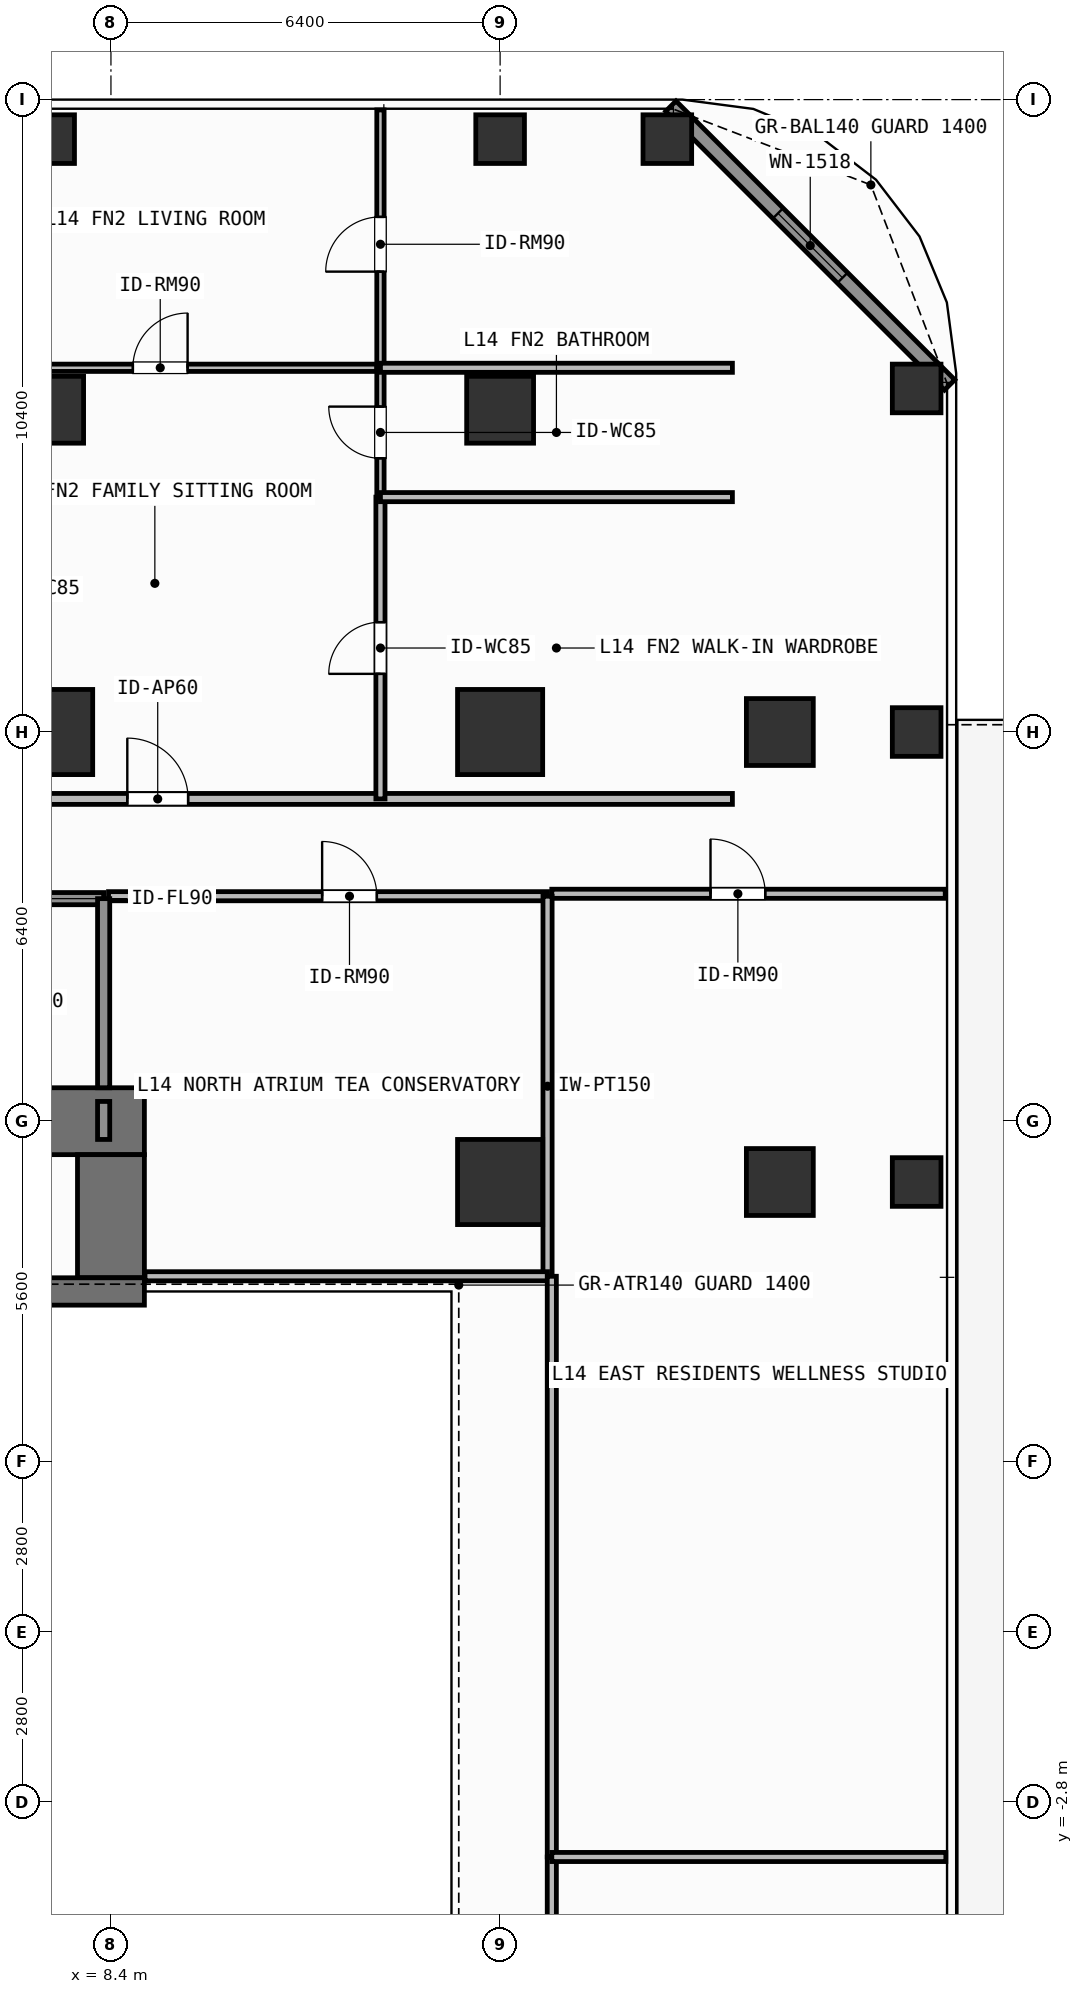
"""IFC4 building model, lengths in metres.
Left out: names, types, materials, properties, quantities, classifications, styles, units other than length and angle.
Written with IfcOpenShell. Run it as: python <this file> out.ifc"""

import sys

from ifc_helpers import new_model, si_unit, direction, frame, frame_2d, origin, origin_2d, place, context, subcontext, project, spatial, rectangle, hollow_rectangle, extrude, element, fill, save


model = new_model("IFC4")
c1 = context("Model", 3, precision=1e-05, world=origin(), true_north=direction((0.0, 1.0)))
c2 = subcontext(c1, "Body", "Model", "MODEL_VIEW")
j1 = project(units=[si_unit("LENGTHUNIT", "METRE"), si_unit("PLANEANGLEUNIT", "RADIAN")], contexts=[c1])
p1 = place(None, origin())
s1 = spatial("IfcSite", under=j1, at=p1, CompositionType="ELEMENT")
p2 = place(p1, origin())
s2 = spatial("IfcBuilding", under=s1, at=p2, CompositionType="ELEMENT")
p3 = place(p2, frame((0.0, 0.0, 54.0)))
s3 = spatial("IfcBuildingStorey", under=s2, at=p3, CompositionType="ELEMENT", Elevation=54.0)
p4 = place(p3, frame((-7.55, 8.4, 0.0), z_axis=(0.0, 0.0, 1.0), x_axis=(1.0, 0.0, 0.0)))
e1 = element("IfcWall", 1, at=p4, inside=s3, PredefinedType="SHEAR", context=c2, shape_type="SweptSolid", body=[
    extrude(rectangle(XDim=16.5, YDim=1.1, at=frame_2d((8.25, 0.0))), origin(), (0.0, 0.0, 1.0), 3.9),
])
p5 = place(p3, frame((8.4, 5.825, 0.0), z_axis=(0.0, 0.0, 1.0), x_axis=(0.0, 1.0, 0.0)))
e2 = element("IfcWall", 2, at=p5, inside=s3, PredefinedType="SHEAR", context=c2, shape_type="SweptSolid", body=[
    extrude(rectangle(XDim=2.025, YDim=1.1, at=frame_2d((1.013, 0.0))), origin(), (0.0, 0.0, 1.0), 3.9),
])
p6 = place(p3, frame((3.045, 5.6, 0.0), z_axis=(0.0, 0.0, 1.0), x_axis=(1.0, 0.0, 0.0)))
e3 = element("IfcWall", 3, at=p6, inside=s3, PredefinedType="SHEAR", context=c2, shape_type="SweptSolid", body=[
    extrude(rectangle(XDim=5.905, YDim=0.45, at=frame_2d((2.953, 0.0))), origin(), (0.0, 0.0, 1.0), 3.9),
])
for number, where, z_axis, x_axis in (
    (4, (7.4, 14.8, 0.0), (0.0, 0.0, 1.0), (1.0, 0.0, 0.0)),
    (5, (14.8, 14.8, 0.0), (0.0, 0.0, 1.0), (1.0, 0.0, 0.0)),
    (6, (14.8, 7.4, 0.0), (0.0, 0.0, 1.0), (1.0, 0.0, 0.0)),
):
    element("IfcColumn", number, at=place(p3, frame(where, z_axis=z_axis, x_axis=x_axis)), inside=s3, PredefinedType="COLUMN", context=c2, shape_type="SweptSolid", body=[
        extrude(rectangle(XDim=1.4, YDim=1.4, at=origin_2d()), origin(), (0.0, 0.0, 1.0), 3.9),
    ])
for number, where, z_axis, x_axis in (
    (7, (19.4, 7.4, 0.0), (0.0, 0.0, 1.0), (1.0, 0.0, 0.0)),
    (8, (19.4, 14.8, 0.0), (0.0, 0.0, 1.0), (1.0, 0.0, 0.0)),
    (9, (7.4, 20.1, 0.0), (0.0, 0.0, 1.0), (1.0, 0.0, 0.0)),
    (10, (14.8, 20.1, 0.0), (0.0, 0.0, 1.0), (1.0, 0.0, 0.0)),
):
    element("IfcColumn", number, at=place(p3, frame(where, z_axis=z_axis, x_axis=x_axis)), inside=s3, PredefinedType="COLUMN", context=c2, shape_type="SweptSolid", body=[
        extrude(rectangle(XDim=1.1, YDim=1.1, at=origin_2d()), origin(), (0.0, 0.0, 1.0), 3.9),
    ])
for number, where, z_axis, x_axis in (
    (11, (17.55, 24.55, 0.0), (0.0, 0.0, 1.0), (1.0, 0.0, 0.0)),
    (12, (21.65, 20.45, 0.0), (0.0, 0.0, 1.0), (1.0, 0.0, 0.0)),
    (13, (7.4, 24.55, 0.0), (0.0, 0.0, 1.0), (1.0, 0.0, 0.0)),
    (14, (14.8, 24.55, 0.0), (0.0, 0.0, 1.0), (1.0, 0.0, 0.0)),
    (15, (21.65, 7.4, 0.0), (0.0, 0.0, 1.0), (1.0, 0.0, 0.0)),
    (16, (21.65, 14.8, 0.0), (0.0, 0.0, 1.0), (1.0, 0.0, 0.0)),
):
    element("IfcColumn", number, at=place(p3, frame(where, z_axis=z_axis, x_axis=x_axis)), inside=s3, PredefinedType="COLUMN", context=c2, shape_type="SweptSolid", body=[
        extrude(hollow_rectangle(XDim=0.8, YDim=0.8, WallThickness=0.036, at=origin_2d()), origin(), (0.0, 0.0, 1.0), 3.9),
    ])
p7 = place(p3, frame((17.608, 25.092, 0.0), z_axis=(0.0, 0.0, 1.0), x_axis=(0.707106781187, -0.707106781187, 0.0)))
e17 = element("IfcWall", 17, at=p7, inside=s3, PredefinedType="SOLIDWALL", context=c2, shape_type="SweptSolid", body=[
    extrude(rectangle(XDim=6.484, YDim=0.24, at=frame_2d((3.242, 0.0))), origin(), (0.0, 0.0, 1.0), 3.68),
])
p8 = place(p7, frame((2.492, 0.0, 0.8)))
e18 = element("IfcOpeningElement", 18, at=p8, cuts=e17, PredefinedType="OPENING", context=c2, shape_type="SweptSolid", body=[
    extrude(rectangle(XDim=1.5, YDim=1.85, at=frame_2d((0.75, 0.925))), frame((0.0, 0.13, 0.0), z_axis=(0.0, -1.0, 0.0), x_axis=(1.0, 0.0, 0.0)), (0.0, 0.0, 1.0), 0.26),
])
p9 = place(p3, frame((4.58, 12.06, 0.0), z_axis=(0.0, 0.0, 1.0), x_axis=(1.0, 0.0, 0.0)))
e19 = element("IfcWall", 19, at=p9, inside=s3, PredefinedType="SOLIDWALL", context=c2, shape_type="SweptSolid", body=[
    extrude(rectangle(XDim=3.7, YDim=0.2, at=frame_2d((1.85, 0.0))), origin(), (0.0, 0.0, 1.0), 3.68),
])
p10 = place(p9, frame((1.212, 0.0, 0.0)))
e20 = element("IfcOpeningElement", 20, at=p10, cuts=e19, PredefinedType="OPENING", context=c2, shape_type="SweptSolid", body=[
    extrude(rectangle(XDim=1.1, YDim=2.15, at=frame_2d((0.55, 1.075))), frame((0.0, 0.11, 0.0), z_axis=(0.0, -1.0, 0.0), x_axis=(1.0, 0.0, 0.0)), (0.0, 0.0, 1.0), 0.22),
])
p11 = place(p3, frame((8.36, 12.1, 0.0), z_axis=(0.0, 0.0, 1.0), x_axis=(1.0, 0.0, 0.0)))
e21 = element("IfcWall", 21, at=p11, inside=s3, PredefinedType="PARTITIONING", context=c2, shape_type="SweptSolid", body=[
    extrude(rectangle(XDim=7.22, YDim=0.15, at=frame_2d((3.61, 0.0))), origin(), (0.0, 0.0, 1.0), 3.68),
])
p12 = place(p11, frame((3.513, 0.0, 0.0)))
e22 = element("IfcOpeningElement", 22, at=p12, cuts=e21, PredefinedType="OPENING", context=c2, shape_type="SweptSolid", body=[
    extrude(rectangle(XDim=0.9, YDim=2.1, at=frame_2d((0.45, 1.05))), frame((0.0, 0.085, 0.0), z_axis=(0.0, -1.0, 0.0), x_axis=(1.0, 0.0, 0.0)), (0.0, 0.0, 1.0), 0.17),
])
p13 = place(p3, frame((0.974, 13.7, 0.0), z_axis=(0.0, 0.0, 1.0), x_axis=(1.0, 0.0, 0.0)))
e23 = element("IfcWall", 23, at=p13, inside=s3, PredefinedType="PARTITIONING", context=c2, shape_type="SweptSolid", body=[
    extrude(rectangle(XDim=17.646, YDim=0.18, at=frame_2d((8.823, 0.0))), origin(), (0.0, 0.0, 1.0), 3.68),
])
p14 = place(p13, frame((7.695, 0.0, 0.0)))
e24 = element("IfcOpeningElement", 24, at=p14, cuts=e23, PredefinedType="OPENING", context=c2, shape_type="SweptSolid", body=[
    extrude(rectangle(XDim=1.0, YDim=2.2, at=frame_2d((0.5, 1.1))), frame((0.0, 0.1, 0.0), z_axis=(0.0, -1.0, 0.0), x_axis=(1.0, 0.0, 0.0)), (0.0, 0.0, 1.0), 0.2),
])
p15 = place(p3, frame((5.412, 20.79, 0.0), z_axis=(0.0, 0.0, 1.0), x_axis=(1.0, 0.0, 0.0)))
e25 = element("IfcWall", 25, at=p15, inside=s3, PredefinedType="PARTITIONING", context=c2, shape_type="SweptSolid", body=[
    extrude(rectangle(XDim=7.42, YDim=0.12, at=frame_2d((3.71, 0.0))), origin(), (0.0, 0.0, 1.0), 3.68),
])
p16 = place(p15, frame((3.349, 0.0, 0.0)))
e26 = element("IfcOpeningElement", 26, at=p16, cuts=e25, PredefinedType="OPENING", context=c2, shape_type="SweptSolid", body=[
    extrude(rectangle(XDim=0.9, YDim=2.1, at=frame_2d((0.45, 1.05))), frame((0.0, 0.07, 0.0), z_axis=(0.0, -1.0, 0.0), x_axis=(1.0, 0.0, 0.0)), (0.0, 0.0, 1.0), 0.14),
])
p17 = place(p3, frame((12.832, 13.7, 0.0), z_axis=(0.0, 0.0, 1.0), x_axis=(0.0, 1.0, 0.0)))
e27 = element("IfcWall", 27, at=p17, inside=s3, PredefinedType="PARTITIONING", context=c2, shape_type="SweptSolid", body=[
    extrude(rectangle(XDim=4.963, YDim=0.15, at=frame_2d((2.481, 0.0))), origin(), (0.0, 0.0, 1.0), 3.68),
])
p18 = place(p17, frame((2.056, 0.0, 0.0)))
e28 = element("IfcOpeningElement", 28, at=p18, cuts=e27, PredefinedType="OPENING", context=c2, shape_type="SweptSolid", body=[
    extrude(rectangle(XDim=0.85, YDim=2.1, at=frame_2d((0.425, 1.05))), frame((0.0, 0.085, 0.0), z_axis=(0.0, -1.0, 0.0), x_axis=(1.0, 0.0, 0.0)), (0.0, 0.0, 1.0), 0.17),
])
p19 = place(p3, frame((12.832, 18.663, 0.0), z_axis=(0.0, 0.0, 1.0), x_axis=(0.0, 1.0, 0.0)))
e29 = element("IfcWall", 29, at=p19, inside=s3, PredefinedType="PARTITIONING", context=c2, shape_type="SweptSolid", body=[
    extrude(rectangle(XDim=2.127, YDim=0.12, at=frame_2d((1.063, 0.0))), origin(), (0.0, 0.0, 1.0), 3.68),
])
p20 = place(p19, frame((0.638, 0.0, 0.0)))
e30 = element("IfcOpeningElement", 30, at=p20, cuts=e29, PredefinedType="OPENING", context=c2, shape_type="SweptSolid", body=[
    extrude(rectangle(XDim=0.85, YDim=2.1, at=frame_2d((0.425, 1.05))), frame((0.0, 0.07, 0.0), z_axis=(0.0, -1.0, 0.0), x_axis=(1.0, 0.0, 0.0)), (0.0, 0.0, 1.0), 0.14),
])
p21 = place(p3, frame((12.832, 20.79, 0.0), z_axis=(0.0, 0.0, 1.0), x_axis=(0.0, 1.0, 0.0)))
e31 = element("IfcWall", 31, at=p21, inside=s3, PredefinedType="PARTITIONING", context=c2, shape_type="SweptSolid", body=[
    extrude(rectangle(XDim=4.24, YDim=0.12, at=frame_2d((2.12, 0.0))), origin(), (0.0, 0.0, 1.0), 3.68),
])
p22 = place(p21, frame((1.581, 0.0, 0.0)))
e32 = element("IfcOpeningElement", 32, at=p22, cuts=e31, PredefinedType="OPENING", context=c2, shape_type="SweptSolid", body=[
    extrude(rectangle(XDim=0.9, YDim=2.1, at=frame_2d((0.45, 1.05))), frame((0.0, 0.07, 0.0), z_axis=(0.0, -1.0, 0.0), x_axis=(1.0, 0.0, 0.0)), (0.0, 0.0, 1.0), 0.14),
])
p23 = place(p3, frame((15.65, 12.14, 0.0), z_axis=(0.0, 0.0, 1.0), x_axis=(1.0, 0.0, 0.0)))
e33 = element("IfcWall", 33, at=p23, inside=s3, PredefinedType="PARTITIONING", context=c2, shape_type="SweptSolid", body=[
    extrude(rectangle(XDim=6.47, YDim=0.15, at=frame_2d((3.235, 0.0))), origin(), (0.0, 0.0, 1.0), 3.68),
])
p24 = place(p23, frame((2.61, 0.0, 0.0)))
e34 = element("IfcOpeningElement", 34, at=p24, cuts=e33, PredefinedType="OPENING", context=c2, shape_type="SweptSolid", body=[
    extrude(rectangle(XDim=0.9, YDim=2.1, at=frame_2d((0.45, 1.05))), frame((0.0, 0.085, 0.0), z_axis=(0.0, -1.0, 0.0), x_axis=(1.0, 0.0, 0.0)), (0.0, 0.0, 1.0), 0.17),
])
p25 = place(p3, frame((8.28, 8.95, 0.0), z_axis=(0.0, 0.0, 1.0), x_axis=(0.0, 1.0, 0.0)))
e35 = element("IfcWall", 35, at=p25, inside=s3, PredefinedType="SOLIDWALL", context=c2, shape_type="SweptSolid", body=[
    extrude(rectangle(XDim=3.11, YDim=0.2, at=frame_2d((1.555, 0.0))), origin(), (0.0, 0.0, 1.0), 3.68),
])
p26 = place(p3, frame((8.28, 8.1, 0.0), z_axis=(0.0, 0.0, 1.0), x_axis=(0.0, 1.0, 0.0)))
e36 = element("IfcWall", 36, at=p26, inside=s3, PredefinedType="SOLIDWALL", context=c2, shape_type="SweptSolid", body=[
    extrude(rectangle(XDim=0.625, YDim=0.2, at=frame_2d((0.312, 0.0))), origin(), (0.0, 0.0, 1.0), 3.68),
])
p27 = place(p3, frame((15.58, 5.85, 0.0), z_axis=(0.0, 0.0, 1.0), x_axis=(0.0, 1.0, 0.0)))
e37 = element("IfcWall", 37, at=p27, inside=s3, PredefinedType="PARTITIONING", context=c2, shape_type="SweptSolid", body=[
    extrude(rectangle(XDim=6.25, YDim=0.15, at=frame_2d((3.125, 0.0))), origin(), (0.0, 0.0, 1.0), 3.68),
])
p28 = place(p3, frame((8.96, 5.85, 0.0), z_axis=(0.0, 0.0, 1.0), x_axis=(1.0, 0.0, 0.0)))
e38 = element("IfcWall", 38, at=p28, inside=s3, PredefinedType="PARTITIONING", context=c2, shape_type="SweptSolid", body=[
    extrude(rectangle(XDim=6.62, YDim=0.15, at=frame_2d((3.31, 0.0))), origin(), (0.0, 0.0, 1.0), 3.68),
])
for number, where, z_axis, x_axis in (
    (39, (12.832, 18.663, 0.0), (0.0, 0.0, 1.0), (1.0, 0.0, 0.0)),
    (40, (12.832, 20.79, 0.0), (0.0, 0.0, 1.0), (1.0, 0.0, 0.0)),
):
    element("IfcWall", number, at=place(p3, frame(where, z_axis=z_axis, x_axis=x_axis)), inside=s3, PredefinedType="PARTITIONING", context=c2, shape_type="SweptSolid", body=[
        extrude(rectangle(XDim=5.788, YDim=0.15, at=frame_2d((2.894, 0.0))), origin(), (0.0, 0.0, 1.0), 3.68),
    ])
p29 = place(p3, frame((15.65, -5.85, 0.0), z_axis=(0.0, 0.0, 1.0), x_axis=(0.0, 1.0, 0.0)))
e41 = element("IfcWall", 41, at=p29, inside=s3, PredefinedType="PARTITIONING", context=c2, shape_type="SweptSolid", body=[
    extrude(rectangle(XDim=2.15, YDim=0.15, at=frame_2d((1.075, 0.0))), origin(), (0.0, 0.0, 1.0), 3.68),
])
p30 = place(p3, frame((15.65, -3.7, 0.0), z_axis=(0.0, 0.0, 1.0), x_axis=(0.0, 1.0, 0.0)))
e42 = element("IfcWall", 42, at=p30, inside=s3, PredefinedType="PARTITIONING", context=c2, shape_type="SweptSolid", body=[
    extrude(rectangle(XDim=9.55, YDim=0.15, at=frame_2d((4.775, 0.0))), origin(), (0.0, 0.0, 1.0), 3.68),
])
p31 = place(p3, frame((15.65, -3.7, 0.0), z_axis=(0.0, 0.0, 1.0), x_axis=(1.0, 0.0, 0.0)))
e43 = element("IfcWall", 43, at=p31, inside=s3, PredefinedType="PARTITIONING", context=c2, shape_type="SweptSolid", body=[
    extrude(rectangle(XDim=6.48, YDim=0.15, at=frame_2d((3.24, 0.0))), origin(), (0.0, 0.0, 1.0), 3.68),
])
p32 = place(p8, origin())
e44 = element("IfcWindow", 44, at=p32, inside=s3, PartitioningType="SINGLE_PANEL", PredefinedType="WINDOW", context=c2, shape_type="SweptSolid", body=[
    extrude(rectangle(XDim=1.5, YDim=1.85, at=frame_2d((0.75, 0.925))), frame((0.0, 0.03, 0.0), z_axis=(0.0, -1.0, 0.0), x_axis=(1.0, 0.0, 0.0)), (0.0, 0.0, 1.0), 0.06),
])
fill(e18, e44)
p33 = place(p12, origin())
e45 = element("IfcDoor", 45, at=p33, inside=s3, OperationType="SINGLE_SWING_LEFT", PredefinedType="DOOR", context=c2, shape_type="SweptSolid", body=[
    extrude(rectangle(XDim=0.9, YDim=2.1, at=frame_2d((0.45, 1.05))), frame((0.0, 0.025, 0.0), z_axis=(0.0, -1.0, 0.0), x_axis=(1.0, 0.0, 0.0)), (0.0, 0.0, 1.0), 0.05),
])
fill(e22, e45)
p34 = place(p14, origin())
e46 = element("IfcDoor", 46, at=p34, inside=s3, OperationType="SINGLE_SWING_LEFT", PredefinedType="DOOR", context=c2, shape_type="SweptSolid", body=[
    extrude(rectangle(XDim=1.0, YDim=2.2, at=frame_2d((0.5, 1.1))), frame((0.0, 0.025, 0.0), z_axis=(0.0, -1.0, 0.0), x_axis=(1.0, 0.0, 0.0)), (0.0, 0.0, 1.0), 0.05),
])
fill(e24, e46)
p35 = place(p16, origin())
e47 = element("IfcDoor", 47, at=p35, inside=s3, OperationType="SINGLE_SWING_RIGHT", PredefinedType="DOOR", context=c2, shape_type="SweptSolid", body=[
    extrude(rectangle(XDim=0.9, YDim=2.1, at=frame_2d((0.45, 1.05))), frame((0.0, 0.025, 0.0), z_axis=(0.0, -1.0, 0.0), x_axis=(1.0, 0.0, 0.0)), (0.0, 0.0, 1.0), 0.05),
])
fill(e26, e47)
p36 = place(p18, origin())
e48 = element("IfcDoor", 48, at=p36, inside=s3, OperationType="SINGLE_SWING_LEFT", PredefinedType="DOOR", context=c2, shape_type="SweptSolid", body=[
    extrude(rectangle(XDim=0.85, YDim=2.1, at=frame_2d((0.425, 1.05))), frame((0.0, 0.025, 0.0), z_axis=(0.0, -1.0, 0.0), x_axis=(1.0, 0.0, 0.0)), (0.0, 0.0, 1.0), 0.05),
])
fill(e28, e48)
p37 = place(p20, origin())
e49 = element("IfcDoor", 49, at=p37, inside=s3, OperationType="SINGLE_SWING_RIGHT", PredefinedType="DOOR", context=c2, shape_type="SweptSolid", body=[
    extrude(rectangle(XDim=0.85, YDim=2.1, at=frame_2d((0.425, 1.05))), frame((0.0, 0.025, 0.0), z_axis=(0.0, -1.0, 0.0), x_axis=(1.0, 0.0, 0.0)), (0.0, 0.0, 1.0), 0.05),
])
fill(e30, e49)
p38 = place(p22, origin())
e50 = element("IfcDoor", 50, at=p38, inside=s3, OperationType="SINGLE_SWING_LEFT", PredefinedType="DOOR", context=c2, shape_type="SweptSolid", body=[
    extrude(rectangle(XDim=0.9, YDim=2.1, at=frame_2d((0.45, 1.05))), frame((0.0, 0.025, 0.0), z_axis=(0.0, -1.0, 0.0), x_axis=(1.0, 0.0, 0.0)), (0.0, 0.0, 1.0), 0.05),
])
fill(e32, e50)
p39 = place(p24, origin())
e51 = element("IfcDoor", 51, at=p39, inside=s3, OperationType="SINGLE_SWING_LEFT", PredefinedType="DOOR", context=c2, shape_type="SweptSolid", body=[
    extrude(rectangle(XDim=0.9, YDim=2.1, at=frame_2d((0.45, 1.05))), frame((0.0, 0.025, 0.0), z_axis=(0.0, -1.0, 0.0), x_axis=(1.0, 0.0, 0.0)), (0.0, 0.0, 1.0), 0.05),
])
fill(e34, e51)
save(model, sys.argv[1])
